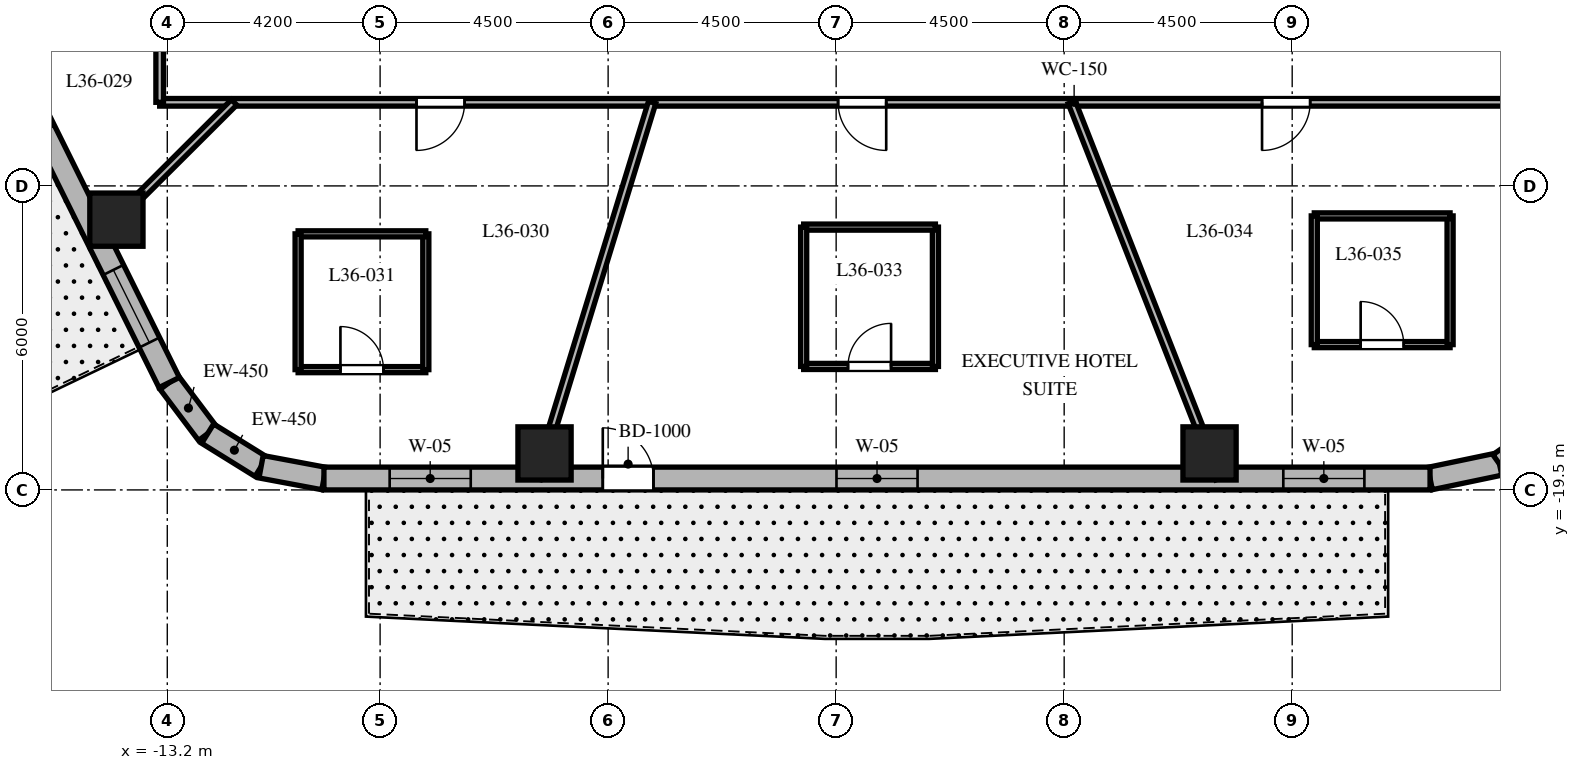
"""IFC4 building model, lengths in metres.
Left out: names, types, materials, properties, quantities, classifications, styles, units other than length and angle.
Written with IfcOpenShell. Run it as: python <this file> out.ifc"""

import sys

from ifc_helpers import new_model, si_unit, direction, frame, frame_2d, origin, origin_2d, place, context, subcontext, project, spatial, rectangle, extrude, element, fill, save


model = new_model("IFC4")
c1 = context("Model", 3, precision=1e-05, world=origin(), true_north=direction((0.0, 1.0)))
c2 = subcontext(c1, "Body", "Model", "MODEL_VIEW")
j1 = project(units=[si_unit("LENGTHUNIT", "METRE"), si_unit("PLANEANGLEUNIT", "RADIAN")], contexts=[c1])
p1 = place(None, origin())
s1 = spatial("IfcSite", under=j1, at=p1, CompositionType="ELEMENT")
p2 = place(p1, origin())
s2 = spatial("IfcBuilding", under=s1, at=p2, CompositionType="ELEMENT")
p3 = place(p2, frame((0.0, 0.0, 148.0)))
s3 = spatial("IfcBuildingStorey", under=s2, at=p3, CompositionType="ELEMENT", Elevation=148.0)
for number, where, z_axis, x_axis in (
    (1, (-5.755, -18.78, 0.0), (0.0, 0.0, 1.0), (1.0, 0.0, 0.0)),
    (2, (7.369, -18.78, 0.0), (0.0, 0.0, 1.0), (1.0, 0.0, 0.0)),
    (3, (-14.204, -14.166, 0.0), (0.0, 0.0, 1.0), (1.0, 0.0, 0.0)),
):
    element("IfcColumn", number, at=place(p3, frame(where, z_axis=z_axis, x_axis=x_axis)), inside=s3, PredefinedType="COLUMN", context=c2, shape_type="SweptSolid", body=[
        extrude(rectangle(XDim=1.05, YDim=1.05, at=origin_2d()), origin(), (0.0, 0.0, 1.0), 3.7),
    ])
p4 = place(p3, frame((-13.162, -17.381, 0.0), z_axis=(0.0, 0.0, 1.0), x_axis=(0.601515770517, -0.798860925205, 0.0)))
e4 = element("IfcWall", 4, at=p4, inside=s3, PredefinedType="SOLIDWALL", context=c2, shape_type="SweptSolid", body=[
    extrude(rectangle(XDim=1.262, YDim=0.45, at=frame_2d((0.631, 0.0))), origin(), (0.0, 0.0, 1.0), 3.4),
])
p5 = place(p3, frame((-12.403, -18.389, 0.0), z_axis=(0.0, 0.0, 1.0), x_axis=(0.849795170926, -0.527113049991, 0.0)))
e5 = element("IfcWall", 5, at=p5, inside=s3, PredefinedType="SOLIDWALL", context=c2, shape_type="SweptSolid", body=[
    extrude(rectangle(XDim=1.241, YDim=0.45, at=frame_2d((0.62, 0.0))), origin(), (0.0, 0.0, 1.0), 3.4),
])
p6 = place(p3, frame((-11.349, -19.043, 0.0), z_axis=(0.0, 0.0, 1.0), x_axis=(0.982931267051, -0.183973161772, 0.0)))
e6 = element("IfcWall", 6, at=p6, inside=s3, PredefinedType="SOLIDWALL", context=c2, shape_type="SweptSolid", body=[
    extrude(rectangle(XDim=1.262, YDim=0.45, at=frame_2d((0.631, 0.0))), origin(), (0.0, 0.0, 1.0), 3.4),
])
p7 = place(p3, frame((11.72, -19.275, 0.0), z_axis=(0.0, 0.0, 1.0), x_axis=(0.97893106758, 0.204191001093, 0.0)))
e7 = element("IfcWall", 7, at=p7, inside=s3, PredefinedType="SOLIDWALL", context=c2, shape_type="SweptSolid", body=[
    extrude(rectangle(XDim=1.4, YDim=0.45, at=frame_2d((0.7, 0.0))), origin(), (0.0, 0.0, 1.0), 3.4),
])
p8 = place(p3, frame((13.091, -18.989, 0.0), z_axis=(0.0, 0.0, 1.0), x_axis=(0.815574637848, 0.578651890258, 0.0)))
e8 = element("IfcWall", 8, at=p8, inside=s3, PredefinedType="SOLIDWALL", context=c2, shape_type="SweptSolid", body=[
    extrude(rectangle(XDim=1.377, YDim=0.45, at=frame_2d((0.688, 0.0))), origin(), (0.0, 0.0, 1.0), 3.4),
])
p9 = place(p3, frame((-10.108, -19.275, 0.0), z_axis=(0.0, 0.0, 1.0), x_axis=(1.0, 0.0, 0.0)))
e9 = element("IfcWall", 9, at=p9, inside=s3, PredefinedType="SOLIDWALL", context=c2, shape_type="SweptSolid", body=[
    extrude(rectangle(XDim=21.829, YDim=0.45, at=frame_2d((10.915, 0.0))), origin(), (0.0, 0.0, 1.0), 3.4),
])
p10 = place(p9, frame((5.503, 0.0, 0.0)))
e10 = element("IfcOpeningElement", 10, at=p10, cuts=e9, PredefinedType="OPENING", context=c2, shape_type="SweptSolid", body=[
    extrude(rectangle(XDim=1.0, YDim=2.15, at=frame_2d((0.5, 1.075))), frame((0.0, 0.235, 0.0), z_axis=(0.0, -1.0, 0.0), x_axis=(1.0, 0.0, 0.0)), (0.0, 0.0, 1.0), 0.47),
])
p11 = place(p9, frame((1.297, 0.0, 0.8)))
e11 = element("IfcOpeningElement", 11, at=p11, cuts=e9, PredefinedType="OPENING", context=c2, shape_type="SweptSolid", body=[
    extrude(rectangle(XDim=1.6, YDim=1.75, at=frame_2d((0.8, 0.875))), frame((0.0, 0.235, 0.0), z_axis=(0.0, -1.0, 0.0), x_axis=(1.0, 0.0, 0.0)), (0.0, 0.0, 1.0), 0.47),
])
p12 = place(p9, frame((10.115, 0.0, 0.8)))
e12 = element("IfcOpeningElement", 12, at=p12, cuts=e9, PredefinedType="OPENING", context=c2, shape_type="SweptSolid", body=[
    extrude(rectangle(XDim=1.6, YDim=1.75, at=frame_2d((0.8, 0.875))), frame((0.0, 0.235, 0.0), z_axis=(0.0, -1.0, 0.0), x_axis=(1.0, 0.0, 0.0)), (0.0, 0.0, 1.0), 0.47),
])
p13 = place(p9, frame((18.933, 0.0, 0.8)))
e13 = element("IfcOpeningElement", 13, at=p13, cuts=e9, PredefinedType="OPENING", context=c2, shape_type="SweptSolid", body=[
    extrude(rectangle(XDim=1.6, YDim=1.75, at=frame_2d((0.8, 0.875))), frame((0.0, 0.235, 0.0), z_axis=(0.0, -1.0, 0.0), x_axis=(1.0, 0.0, 0.0)), (0.0, 0.0, 1.0), 0.47),
])
p14 = place(p3, frame((-20.618, -2.344, 0.0), z_axis=(0.0, 0.0, 1.0), x_axis=(0.444243691097, -0.895905990002, 0.0)))
e14 = element("IfcWall", 14, at=p14, inside=s3, PredefinedType="SOLIDWALL", context=c2, shape_type="SweptSolid", body=[
    extrude(rectangle(XDim=16.784, YDim=0.45, at=frame_2d((8.392, 0.0))), origin(), (0.0, 0.0, 1.0), 3.4),
])
p15 = place(p14, frame((4.535, 0.0, 0.0)))
e15 = element("IfcOpeningElement", 15, at=p15, cuts=e14, PredefinedType="OPENING", context=c2, shape_type="SweptSolid", body=[
    extrude(rectangle(XDim=0.95, YDim=2.15, at=frame_2d((0.475, 1.075))), frame((0.0, 0.235, 0.0), z_axis=(0.0, -1.0, 0.0), x_axis=(1.0, 0.0, 0.0)), (0.0, 0.0, 1.0), 0.47),
])
p16 = place(p14, frame((0.931, 0.0, 0.8)))
e16 = element("IfcOpeningElement", 16, at=p16, cuts=e14, PredefinedType="OPENING", context=c2, shape_type="SweptSolid", body=[
    extrude(rectangle(XDim=1.6, YDim=1.75, at=frame_2d((0.8, 0.875))), frame((0.0, 0.235, 0.0), z_axis=(0.0, -1.0, 0.0), x_axis=(1.0, 0.0, 0.0)), (0.0, 0.0, 1.0), 0.47),
])
p17 = place(p14, frame((5.942, 0.0, 0.8)))
e17 = element("IfcOpeningElement", 17, at=p17, cuts=e14, PredefinedType="OPENING", context=c2, shape_type="SweptSolid", body=[
    extrude(rectangle(XDim=1.0, YDim=1.65, at=frame_2d((0.5, 0.825))), frame((0.0, 0.235, 0.0), z_axis=(0.0, -1.0, 0.0), x_axis=(1.0, 0.0, 0.0)), (0.0, 0.0, 1.0), 0.47),
])
p18 = place(p14, frame((9.633, 0.0, 0.8)))
e18 = element("IfcOpeningElement", 18, at=p18, cuts=e14, PredefinedType="OPENING", context=c2, shape_type="SweptSolid", body=[
    extrude(rectangle(XDim=1.6, YDim=1.75, at=frame_2d((0.8, 0.875))), frame((0.0, 0.235, 0.0), z_axis=(0.0, -1.0, 0.0), x_axis=(1.0, 0.0, 0.0)), (0.0, 0.0, 1.0), 0.47),
])
p19 = place(p14, frame((14.303, 0.0, 0.8)))
e19 = element("IfcOpeningElement", 19, at=p19, cuts=e14, PredefinedType="OPENING", context=c2, shape_type="SweptSolid", body=[
    extrude(rectangle(XDim=1.6, YDim=1.75, at=frame_2d((0.8, 0.875))), frame((0.0, 0.235, 0.0), z_axis=(0.0, -1.0, 0.0), x_axis=(1.0, 0.0, 0.0)), (0.0, 0.0, 1.0), 0.47),
])
p20 = place(p3, frame((13.35, -11.85, 0.0), z_axis=(0.0, 0.0, 1.0), x_axis=(-1.0, 0.0, 0.0)))
e20 = element("IfcWall", 20, at=p20, inside=s3, PredefinedType="PARTITIONING", context=c2, shape_type="SweptSolid", body=[
    extrude(rectangle(XDim=26.7, YDim=0.15, at=frame_2d((13.35, 0.0))), origin(), (0.0, 0.0, 1.0), 2.84),
])
p21 = place(p20, frame((20.682, 0.0, 0.0)))
e21 = element("IfcOpeningElement", 21, at=p21, cuts=e20, PredefinedType="OPENING", context=c2, shape_type="SweptSolid", body=[
    extrude(rectangle(XDim=0.95, YDim=2.03, at=frame_2d((0.475, 1.015))), frame((0.0, 0.085, 0.0), z_axis=(0.0, -1.0, 0.0), x_axis=(1.0, 0.0, 0.0)), (0.0, 0.0, 1.0), 0.17),
])
p22 = place(p20, frame((12.362, 0.0, 0.0)))
e22 = element("IfcOpeningElement", 22, at=p22, cuts=e20, PredefinedType="OPENING", context=c2, shape_type="SweptSolid", body=[
    extrude(rectangle(XDim=0.95, YDim=2.03, at=frame_2d((0.475, 1.015))), frame((0.0, 0.085, 0.0), z_axis=(0.0, -1.0, 0.0), x_axis=(1.0, 0.0, 0.0)), (0.0, 0.0, 1.0), 0.17),
])
p23 = place(p20, frame((3.995, 0.0, 0.0)))
e23 = element("IfcOpeningElement", 23, at=p23, cuts=e20, PredefinedType="OPENING", context=c2, shape_type="SweptSolid", body=[
    extrude(rectangle(XDim=0.95, YDim=2.03, at=frame_2d((0.475, 1.015))), frame((0.0, 0.085, 0.0), z_axis=(0.0, -1.0, 0.0), x_axis=(1.0, 0.0, 0.0)), (0.0, 0.0, 1.0), 0.17),
])
p24 = place(p3, frame((-13.35, -11.85, 0.0), z_axis=(0.0, 0.0, 1.0), x_axis=(0.0, 1.0, 0.0)))
e24 = element("IfcWall", 24, at=p24, inside=s3, PredefinedType="PARTITIONING", context=c2, shape_type="SweptSolid", body=[
    extrude(rectangle(XDim=23.7, YDim=0.15, at=frame_2d((11.85, 0.0))), origin(), (0.0, 0.0, 1.0), 2.84),
])
p25 = place(p24, frame((18.389, 0.0, 0.0)))
e25 = element("IfcOpeningElement", 25, at=p25, cuts=e24, PredefinedType="OPENING", context=c2, shape_type="SweptSolid", body=[
    extrude(rectangle(XDim=0.95, YDim=2.03, at=frame_2d((0.475, 1.015))), frame((0.0, 0.085, 0.0), z_axis=(0.0, -1.0, 0.0), x_axis=(1.0, 0.0, 0.0)), (0.0, 0.0, 1.0), 0.17),
])
p26 = place(p24, frame((10.751, 0.0, 0.0)))
e26 = element("IfcOpeningElement", 26, at=p26, cuts=e24, PredefinedType="OPENING", context=c2, shape_type="SweptSolid", body=[
    extrude(rectangle(XDim=0.95, YDim=2.03, at=frame_2d((0.475, 1.015))), frame((0.0, 0.085, 0.0), z_axis=(0.0, -1.0, 0.0), x_axis=(1.0, 0.0, 0.0)), (0.0, 0.0, 1.0), 0.17),
])
p27 = place(p24, frame((5.951, 0.0, 0.0)))
e27 = element("IfcOpeningElement", 27, at=p27, cuts=e24, PredefinedType="OPENING", context=c2, shape_type="SweptSolid", body=[
    extrude(rectangle(XDim=0.9, YDim=2.03, at=frame_2d((0.45, 1.015))), frame((0.0, 0.085, 0.0), z_axis=(0.0, -1.0, 0.0), x_axis=(1.0, 0.0, 0.0)), (0.0, 0.0, 1.0), 0.17),
])
p28 = place(p24, frame((1.993, 0.0, 0.0)))
e28 = element("IfcOpeningElement", 28, at=p28, cuts=e24, PredefinedType="OPENING", context=c2, shape_type="SweptSolid", body=[
    extrude(rectangle(XDim=0.9, YDim=2.03, at=frame_2d((0.45, 1.015))), frame((0.0, 0.085, 0.0), z_axis=(0.0, -1.0, 0.0), x_axis=(1.0, 0.0, 0.0)), (0.0, 0.0, 1.0), 0.17),
])
p29 = place(p3, frame((-11.882, -11.85, 0.0), z_axis=(0.0, 0.0, 1.0), x_axis=(-0.708037373639, -0.706174962407, 0.0)))
e29 = element("IfcWall", 29, at=p29, inside=s3, PredefinedType="PARTITIONING", context=c2, shape_type="SweptSolid", body=[
    extrude(rectangle(XDim=3.802, YDim=0.15, at=frame_2d((1.901, 0.0))), origin(), (0.0, 0.0, 1.0), 2.64),
])
p30 = place(p3, frame((-3.631, -11.85, 0.0), z_axis=(0.0, 0.0, 1.0), x_axis=(-0.293007573338, -0.956110120209, 0.0)))
e30 = element("IfcWall", 30, at=p30, inside=s3, PredefinedType="PARTITIONING", context=c2, shape_type="SweptSolid", body=[
    extrude(rectangle(XDim=7.766, YDim=0.15, at=frame_2d((3.883, 0.0))), origin(), (0.0, 0.0, 1.0), 2.64),
])
p31 = place(p3, frame((4.65, -11.85, 0.0), z_axis=(0.0, 0.0, 1.0), x_axis=(0.365265947993, -0.930903210456, 0.0)))
e31 = element("IfcWall", 31, at=p31, inside=s3, PredefinedType="PARTITIONING", context=c2, shape_type="SweptSolid", body=[
    extrude(rectangle(XDim=7.976, YDim=0.15, at=frame_2d((3.988, 0.0))), origin(), (0.0, 0.0, 1.0), 2.64),
])
p32 = place(p3, frame((-10.618, -17.126, 0.0), z_axis=(0.0, 0.0, 1.0), x_axis=(1.0, 0.0, 0.0)))
e32 = element("IfcWall", 32, at=p32, inside=s3, PredefinedType="PARTITIONING", context=c2, shape_type="SweptSolid", body=[
    extrude(rectangle(XDim=2.52, YDim=0.12, at=frame_2d((1.26, 0.0))), origin(), (0.0, 0.0, 1.0), 2.64),
])
p33 = place(p32, frame((0.835, 0.0, 0.0)))
e33 = element("IfcOpeningElement", 33, at=p33, cuts=e32, PredefinedType="OPENING", context=c2, shape_type="SweptSolid", body=[
    extrude(rectangle(XDim=0.85, YDim=2.03, at=frame_2d((0.425, 1.015))), frame((0.0, 0.07, 0.0), z_axis=(0.0, -1.0, 0.0), x_axis=(1.0, 0.0, 0.0)), (0.0, 0.0, 1.0), 0.14),
])
p34 = place(p3, frame((-8.098, -17.126, 0.0), z_axis=(0.0, 0.0, 1.0), x_axis=(0.0, 1.0, 0.0)))
e34 = element("IfcWall", 34, at=p34, inside=s3, PredefinedType="PARTITIONING", context=c2, shape_type="SweptSolid", body=[
    extrude(rectangle(XDim=2.68, YDim=0.12, at=frame_2d((1.34, 0.0))), origin(), (0.0, 0.0, 1.0), 3.4),
])
p35 = place(p3, frame((-8.098, -14.446, 0.0), z_axis=(0.0, 0.0, 1.0), x_axis=(-1.0, 0.0, 0.0)))
e35 = element("IfcWall", 35, at=p35, inside=s3, PredefinedType="PARTITIONING", context=c2, shape_type="SweptSolid", body=[
    extrude(rectangle(XDim=2.52, YDim=0.12, at=frame_2d((1.26, 0.0))), origin(), (0.0, 0.0, 1.0), 3.4),
])
p36 = place(p3, frame((-10.618, -14.446, 0.0), z_axis=(0.0, 0.0, 1.0), x_axis=(0.0, -1.0, 0.0)))
e36 = element("IfcWall", 36, at=p36, inside=s3, PredefinedType="PARTITIONING", context=c2, shape_type="SweptSolid", body=[
    extrude(rectangle(XDim=2.68, YDim=0.12, at=frame_2d((1.34, 0.0))), origin(), (0.0, 0.0, 1.0), 2.64),
])
p37 = place(p3, frame((-0.641, -17.063, 0.0), z_axis=(0.0, 0.0, 1.0), x_axis=(1.0, 0.0, 0.0)))
e37 = element("IfcWall", 37, at=p37, inside=s3, PredefinedType="PARTITIONING", context=c2, shape_type="SweptSolid", body=[
    extrude(rectangle(XDim=2.6, YDim=0.12, at=frame_2d((1.3, 0.0))), origin(), (0.0, 0.0, 1.0), 3.4),
])
p38 = place(p37, frame((0.875, 0.0, 0.0)))
e38 = element("IfcOpeningElement", 38, at=p38, cuts=e37, PredefinedType="OPENING", context=c2, shape_type="SweptSolid", body=[
    extrude(rectangle(XDim=0.85, YDim=2.03, at=frame_2d((0.425, 1.015))), frame((0.0, 0.07, 0.0), z_axis=(0.0, -1.0, 0.0), x_axis=(1.0, 0.0, 0.0)), (0.0, 0.0, 1.0), 0.14),
])
p39 = place(p3, frame((1.959, -17.063, 0.0), z_axis=(0.0, 0.0, 1.0), x_axis=(0.0, 1.0, 0.0)))
e39 = element("IfcWall", 39, at=p39, inside=s3, PredefinedType="PARTITIONING", context=c2, shape_type="SweptSolid", body=[
    extrude(rectangle(XDim=2.75, YDim=0.12, at=frame_2d((1.375, 0.0))), origin(), (0.0, 0.0, 1.0), 2.841),
])
p40 = place(p3, frame((1.959, -14.313, 0.0), z_axis=(0.0, 0.0, 1.0), x_axis=(-1.0, 0.0, 0.0)))
e40 = element("IfcWall", 40, at=p40, inside=s3, PredefinedType="PARTITIONING", context=c2, shape_type="SweptSolid", body=[
    extrude(rectangle(XDim=2.6, YDim=0.12, at=frame_2d((1.3, 0.0))), origin(), (0.0, 0.0, 1.0), 3.4),
])
p41 = place(p3, frame((-0.641, -14.313, 0.0), z_axis=(0.0, 0.0, 1.0), x_axis=(0.0, -1.0, 0.0)))
e41 = element("IfcWall", 41, at=p41, inside=s3, PredefinedType="PARTITIONING", context=c2, shape_type="SweptSolid", body=[
    extrude(rectangle(XDim=2.75, YDim=0.12, at=frame_2d((1.375, 0.0))), origin(), (0.0, 0.0, 1.0), 2.841),
])
p42 = place(p3, frame((9.436, -16.632, 0.0), z_axis=(0.0, 0.0, 1.0), x_axis=(1.0, 0.0, 0.0)))
e42 = element("IfcWall", 42, at=p42, inside=s3, PredefinedType="PARTITIONING", context=c2, shape_type="SweptSolid", body=[
    extrude(rectangle(XDim=2.68, YDim=0.12, at=frame_2d((1.34, 0.0))), origin(), (0.0, 0.0, 1.0), 2.64),
])
p43 = place(p42, frame((0.915, 0.0, 0.0)))
e43 = element("IfcOpeningElement", 43, at=p43, cuts=e42, PredefinedType="OPENING", context=c2, shape_type="SweptSolid", body=[
    extrude(rectangle(XDim=0.85, YDim=2.03, at=frame_2d((0.425, 1.015))), frame((0.0, 0.07, 0.0), z_axis=(0.0, -1.0, 0.0), x_axis=(1.0, 0.0, 0.0)), (0.0, 0.0, 1.0), 0.14),
])
p44 = place(p3, frame((12.116, -16.632, 0.0), z_axis=(0.0, 0.0, 1.0), x_axis=(0.0, 1.0, 0.0)))
e44 = element("IfcWall", 44, at=p44, inside=s3, PredefinedType="PARTITIONING", context=c2, shape_type="SweptSolid", body=[
    extrude(rectangle(XDim=2.54, YDim=0.12, at=frame_2d((1.27, 0.0))), origin(), (0.0, 0.0, 1.0), 2.64),
])
p45 = place(p3, frame((12.116, -14.092, 0.0), z_axis=(0.0, 0.0, 1.0), x_axis=(-1.0, 0.0, 0.0)))
e45 = element("IfcWall", 45, at=p45, inside=s3, PredefinedType="PARTITIONING", context=c2, shape_type="SweptSolid", body=[
    extrude(rectangle(XDim=2.68, YDim=0.12, at=frame_2d((1.34, 0.0))), origin(), (0.0, 0.0, 1.0), 2.927),
])
p46 = place(p3, frame((9.436, -14.092, 0.0), z_axis=(0.0, 0.0, 1.0), x_axis=(0.0, -1.0, 0.0)))
e46 = element("IfcWall", 46, at=p46, inside=s3, PredefinedType="PARTITIONING", context=c2, shape_type="SweptSolid", body=[
    extrude(rectangle(XDim=2.54, YDim=0.12, at=frame_2d((1.27, 0.0))), origin(), (0.0, 0.0, 1.0), 2.927),
])
p47 = place(p10, origin())
e47 = element("IfcDoor", 47, at=p47, inside=s3, OperationType="SINGLE_SWING_LEFT", PredefinedType="DOOR", context=c2, shape_type="SweptSolid", body=[
    extrude(rectangle(XDim=1.0, YDim=2.15, at=frame_2d((0.5, 1.075))), frame((0.0, 0.025, 0.0), z_axis=(0.0, -1.0, 0.0), x_axis=(1.0, 0.0, 0.0)), (0.0, 0.0, 1.0), 0.05),
])
fill(e10, e47)
p48 = place(p11, origin())
e48 = element("IfcWindow", 48, at=p48, inside=s3, PartitioningType="SINGLE_PANEL", PredefinedType="WINDOW", context=c2, shape_type="SweptSolid", body=[
    extrude(rectangle(XDim=1.6, YDim=1.75, at=frame_2d((0.8, 0.875))), frame((0.0, 0.03, 0.0), z_axis=(0.0, -1.0, 0.0), x_axis=(1.0, 0.0, 0.0)), (0.0, 0.0, 1.0), 0.06),
])
fill(e11, e48)
p49 = place(p12, origin())
e49 = element("IfcWindow", 49, at=p49, inside=s3, PartitioningType="SINGLE_PANEL", PredefinedType="WINDOW", context=c2, shape_type="SweptSolid", body=[
    extrude(rectangle(XDim=1.6, YDim=1.75, at=frame_2d((0.8, 0.875))), frame((0.0, 0.03, 0.0), z_axis=(0.0, -1.0, 0.0), x_axis=(1.0, 0.0, 0.0)), (0.0, 0.0, 1.0), 0.06),
])
fill(e12, e49)
p50 = place(p13, origin())
e50 = element("IfcWindow", 50, at=p50, inside=s3, PartitioningType="SINGLE_PANEL", PredefinedType="WINDOW", context=c2, shape_type="SweptSolid", body=[
    extrude(rectangle(XDim=1.6, YDim=1.75, at=frame_2d((0.8, 0.875))), frame((0.0, 0.03, 0.0), z_axis=(0.0, -1.0, 0.0), x_axis=(1.0, 0.0, 0.0)), (0.0, 0.0, 1.0), 0.06),
])
fill(e13, e50)
p51 = place(p19, origin())
e51 = element("IfcWindow", 51, at=p51, inside=s3, PartitioningType="SINGLE_PANEL", PredefinedType="WINDOW", context=c2, shape_type="SweptSolid", body=[
    extrude(rectangle(XDim=1.6, YDim=1.75, at=frame_2d((0.8, 0.875))), frame((0.0, 0.03, 0.0), z_axis=(0.0, -1.0, 0.0), x_axis=(1.0, 0.0, 0.0)), (0.0, 0.0, 1.0), 0.06),
])
fill(e19, e51)
p52 = place(p21, origin())
e52 = element("IfcDoor", 52, at=p52, inside=s3, OperationType="SINGLE_SWING_RIGHT", PredefinedType="DOOR", context=c2, shape_type="SweptSolid", body=[
    extrude(rectangle(XDim=0.95, YDim=2.03, at=frame_2d((0.475, 1.015))), frame((0.0, 0.025, 0.0), z_axis=(0.0, -1.0, 0.0), x_axis=(1.0, 0.0, 0.0)), (0.0, 0.0, 1.0), 0.05),
])
fill(e21, e52)
p53 = place(p33, origin())
e53 = element("IfcDoor", 53, at=p53, inside=s3, OperationType="SINGLE_SWING_LEFT", PredefinedType="DOOR", context=c2, shape_type="SweptSolid", body=[
    extrude(rectangle(XDim=0.85, YDim=2.03, at=frame_2d((0.425, 1.015))), frame((0.0, 0.025, 0.0), z_axis=(0.0, -1.0, 0.0), x_axis=(1.0, 0.0, 0.0)), (0.0, 0.0, 1.0), 0.05),
])
fill(e33, e53)
p54 = place(p22, origin())
e54 = element("IfcDoor", 54, at=p54, inside=s3, OperationType="SINGLE_SWING_LEFT", PredefinedType="DOOR", context=c2, shape_type="SweptSolid", body=[
    extrude(rectangle(XDim=0.95, YDim=2.03, at=frame_2d((0.475, 1.015))), frame((0.0, 0.025, 0.0), z_axis=(0.0, -1.0, 0.0), x_axis=(1.0, 0.0, 0.0)), (0.0, 0.0, 1.0), 0.05),
])
fill(e22, e54)
p55 = place(p38, origin())
e55 = element("IfcDoor", 55, at=p55, inside=s3, OperationType="SINGLE_SWING_RIGHT", PredefinedType="DOOR", context=c2, shape_type="SweptSolid", body=[
    extrude(rectangle(XDim=0.85, YDim=2.03, at=frame_2d((0.425, 1.015))), frame((0.0, 0.025, 0.0), z_axis=(0.0, -1.0, 0.0), x_axis=(1.0, 0.0, 0.0)), (0.0, 0.0, 1.0), 0.05),
])
fill(e38, e55)
p56 = place(p23, origin())
e56 = element("IfcDoor", 56, at=p56, inside=s3, OperationType="SINGLE_SWING_RIGHT", PredefinedType="DOOR", context=c2, shape_type="SweptSolid", body=[
    extrude(rectangle(XDim=0.95, YDim=2.03, at=frame_2d((0.475, 1.015))), frame((0.0, 0.025, 0.0), z_axis=(0.0, -1.0, 0.0), x_axis=(1.0, 0.0, 0.0)), (0.0, 0.0, 1.0), 0.05),
])
fill(e23, e56)
p57 = place(p43, origin())
e57 = element("IfcDoor", 57, at=p57, inside=s3, OperationType="SINGLE_SWING_LEFT", PredefinedType="DOOR", context=c2, shape_type="SweptSolid", body=[
    extrude(rectangle(XDim=0.85, YDim=2.03, at=frame_2d((0.425, 1.015))), frame((0.0, 0.025, 0.0), z_axis=(0.0, -1.0, 0.0), x_axis=(1.0, 0.0, 0.0)), (0.0, 0.0, 1.0), 0.05),
])
fill(e43, e57)
save(model, sys.argv[1])
